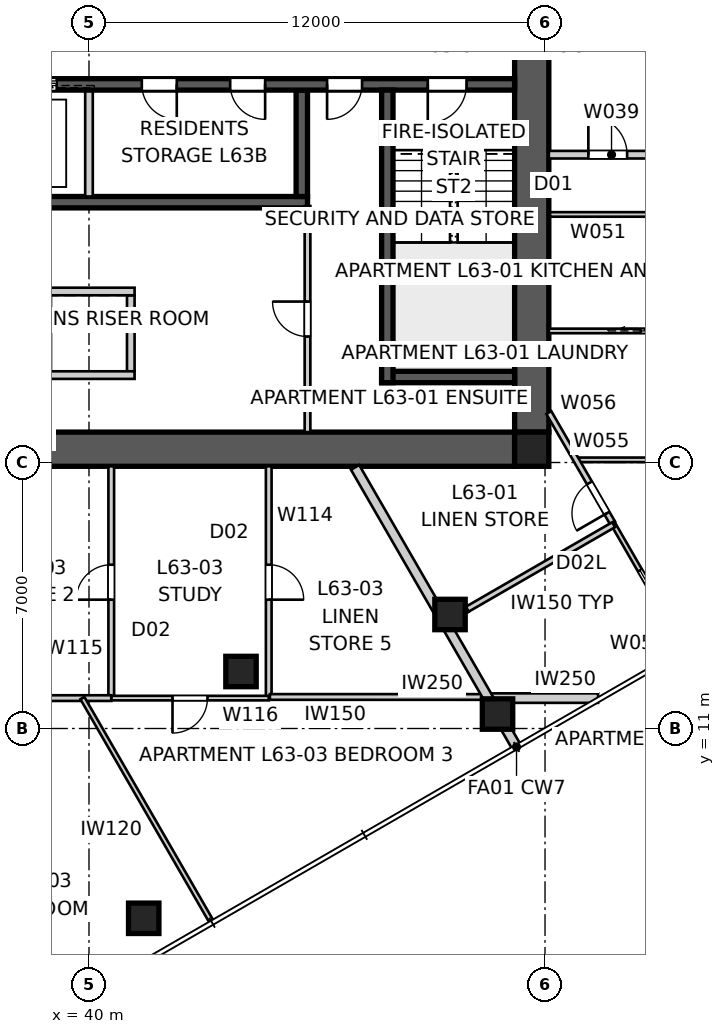
"""IFC4 building model, lengths in metres.
Left out: names, types, materials, properties, quantities, classifications, styles, units other than length and angle.
Written with IfcOpenShell. Run it as: python <this file> out.ifc"""

import sys

from ifc_helpers import new_model, si_unit, direction, frame, frame_2d, origin, origin_2d, place, context, subcontext, project, spatial, polyline, rectangle, outline, extrude, element, fill, save


model = new_model("IFC4")
c1 = context("Model", 3, precision=1e-05, world=origin(), true_north=direction((0.0, 1.0)))
c2 = subcontext(c1, "Body", "Model", "MODEL_VIEW")
j1 = project(units=[si_unit("LENGTHUNIT", "METRE"), si_unit("PLANEANGLEUNIT", "RADIAN")], contexts=[c1])
p1 = place(None, origin())
s1 = spatial("IfcSite", under=j1, at=p1, CompositionType="ELEMENT")
p2 = place(p1, origin())
s2 = spatial("IfcBuilding", under=s1, at=p2, CompositionType="ELEMENT")
p3 = place(p2, frame((0.0, 0.0, 228.6)))
s3 = spatial("IfcBuildingStorey", under=s2, at=p3, CompositionType="ELEMENT", Elevation=228.6)
p4 = place(p3, frame((51.2, 18.35, 0.0), z_axis=(0.0, 0.0, 1.0), x_axis=(-1.0, 0.0, 0.0)))
e1 = element("IfcWall", 1, at=p4, inside=s3, PredefinedType="SHEAR", context=c2, shape_type="SweptSolid", body=[
    extrude(outline(polyline([(0.0, -0.45), (22.4, -0.45), (22.4, -0.025), (22.85, -0.025), (22.85, 0.025), (22.4, 0.025), (22.4, 0.45), (0.0, 0.45), (0.0, 0.025), (-0.45, 0.025), (-0.45, -0.025), (0.0, -0.025), (0.0, -0.45)])), origin(), (0.0, 0.0, 1.0), 3.4),
])
p5 = place(p3, frame((51.65, 18.8, 0.0), z_axis=(0.0, 0.0, 1.0), x_axis=(0.0, 1.0, 0.0)))
e2 = element("IfcWall", 2, at=p5, inside=s3, PredefinedType="SHEAR", context=c2, shape_type="SweptSolid", body=[
    extrude(outline(polyline([(0.0, -0.45), (22.4, -0.45), (22.4, -0.025), (22.85, -0.025), (22.85, 0.025), (22.4, 0.025), (22.4, 0.45), (0.0, 0.45), (0.0, 0.025), (-0.45, 0.025), (-0.45, -0.025), (0.0, -0.025), (0.0, -0.45)])), origin(), (0.0, 0.0, 1.0), 3.4),
])
p6 = place(p5, frame((11.14, 0.0, 0.0)))
e3 = element("IfcOpeningElement", 3, at=p6, cuts=e2, PredefinedType="OPENING", context=c2, shape_type="SweptSolid", body=[
    extrude(rectangle(XDim=1.02, YDim=2.4, at=frame_2d((0.51, 1.2))), frame((0.0, 0.46, 0.0), z_axis=(0.0, -1.0, 0.0), x_axis=(1.0, 0.0, 0.0)), (0.0, 0.0, 1.0), 0.92),
])
p7 = place(p3, frame((51.2, 27.95, 0.0), z_axis=(0.0, 0.0, 1.0), x_axis=(-1.0, 0.0, 0.0)))
e4 = element("IfcWall", 4, at=p7, inside=s3, PredefinedType="SHEAR", context=c2, shape_type="SweptSolid", body=[
    extrude(rectangle(XDim=22.4, YDim=0.3, at=frame_2d((11.2, 0.0))), origin(), (0.0, 0.0, 1.0), 3.4),
])
p8 = place(p7, frame((19.04, 0.0, 0.0)))
e5 = element("IfcOpeningElement", 5, at=p8, cuts=e4, PredefinedType="OPENING", context=c2, shape_type="SweptSolid", body=[
    extrude(rectangle(XDim=0.92, YDim=2.1, at=frame_2d((0.46, 1.05))), frame((0.0, 0.16, 0.0), z_axis=(0.0, -1.0, 0.0), x_axis=(1.0, 0.0, 0.0)), (0.0, 0.0, 1.0), 0.32),
])
p9 = place(p7, frame((1.265, 0.0, 0.0)))
e6 = element("IfcOpeningElement", 6, at=p9, cuts=e4, PredefinedType="OPENING", context=c2, shape_type="SweptSolid", body=[
    extrude(rectangle(XDim=1.02, YDim=2.1, at=frame_2d((0.51, 1.05))), frame((0.0, 0.16, 0.0), z_axis=(0.0, -1.0, 0.0), x_axis=(1.0, 0.0, 0.0)), (0.0, 0.0, 1.0), 0.32),
])
p10 = place(p7, frame((4.015, 0.0, 0.0)))
e7 = element("IfcOpeningElement", 7, at=p10, cuts=e4, PredefinedType="OPENING", context=c2, shape_type="SweptSolid", body=[
    extrude(rectangle(XDim=0.92, YDim=2.1, at=frame_2d((0.46, 1.05))), frame((0.0, 0.16, 0.0), z_axis=(0.0, -1.0, 0.0), x_axis=(1.0, 0.0, 0.0)), (0.0, 0.0, 1.0), 0.32),
])
p11 = place(p7, frame((8.89, 0.0, 0.0)))
e8 = element("IfcOpeningElement", 8, at=p11, cuts=e4, PredefinedType="OPENING", context=c2, shape_type="SweptSolid", body=[
    extrude(rectangle(XDim=0.92, YDim=2.1, at=frame_2d((0.46, 1.05))), frame((0.0, 0.16, 0.0), z_axis=(0.0, -1.0, 0.0), x_axis=(1.0, 0.0, 0.0)), (0.0, 0.0, 1.0), 0.32),
])
p12 = place(p7, frame((6.565, 0.0, 0.0)))
e9 = element("IfcOpeningElement", 9, at=p12, cuts=e4, PredefinedType="OPENING", context=c2, shape_type="SweptSolid", body=[
    extrude(rectangle(XDim=0.92, YDim=2.1, at=frame_2d((0.46, 1.05))), frame((0.0, 0.16, 0.0), z_axis=(0.0, -1.0, 0.0), x_axis=(1.0, 0.0, 0.0)), (0.0, 0.0, 1.0), 0.32),
])
p13 = place(p7, frame((12.05, 0.0, 0.0)))
e10 = element("IfcOpeningElement", 10, at=p13, cuts=e4, PredefinedType="OPENING", context=c2, shape_type="SweptSolid", body=[
    extrude(rectangle(XDim=1.1, YDim=2.1, at=frame_2d((0.55, 1.05))), frame((0.0, 0.16, 0.0), z_axis=(0.0, -1.0, 0.0), x_axis=(1.0, 0.0, 0.0)), (0.0, 0.0, 1.0), 0.32),
])
p14 = place(p7, frame((14.85, 0.0, 0.0)))
e11 = element("IfcOpeningElement", 11, at=p14, cuts=e4, PredefinedType="OPENING", context=c2, shape_type="SweptSolid", body=[
    extrude(rectangle(XDim=1.1, YDim=2.1, at=frame_2d((0.55, 1.05))), frame((0.0, 0.16, 0.0), z_axis=(0.0, -1.0, 0.0), x_axis=(1.0, 0.0, 0.0)), (0.0, 0.0, 1.0), 0.32),
])
p15 = place(p3, frame((45.75, 24.85, 0.0), z_axis=(0.0, 0.0, 1.0), x_axis=(-1.0, 0.0, 0.0)))
e12 = element("IfcWall", 12, at=p15, inside=s3, PredefinedType="SHEAR", context=c2, shape_type="SweptSolid", body=[
    extrude(rectangle(XDim=11.5, YDim=0.3, at=frame_2d((5.75, 0.0))), origin(), (0.0, 0.0, 1.0), 3.4),
])
p16 = place(p3, frame((45.6, 27.8, 0.0), z_axis=(0.0, 0.0, 1.0), x_axis=(0.0, -1.0, 0.0)))
e13 = element("IfcWall", 13, at=p16, inside=s3, PredefinedType="SHEAR", context=c2, shape_type="SweptSolid", body=[
    extrude(rectangle(XDim=2.8, YDim=0.3, at=frame_2d((1.4, 0.0))), origin(), (0.0, 0.0, 1.0), 3.4),
])
p17 = place(p3, frame((40.0, 27.8, 0.0), z_axis=(0.0, 0.0, 1.0), x_axis=(0.0, -1.0, 0.0)))
e14 = element("IfcWall", 14, at=p17, inside=s3, PredefinedType="SOLIDWALL", context=c2, shape_type="SweptSolid", body=[
    extrude(rectangle(XDim=2.8, YDim=0.2, at=frame_2d((1.4, 0.0))), origin(), (0.0, 0.0, 1.0), 3.4),
])
p18 = place(p3, frame((47.85, 27.8, 0.0), z_axis=(0.0, 0.0, 1.0), x_axis=(0.0, -1.0, 0.0)))
e15 = element("IfcWall", 15, at=p18, inside=s3, PredefinedType="SHEAR", context=c2, shape_type="SweptSolid", body=[
    extrude(rectangle(XDim=7.7, YDim=0.3, at=frame_2d((3.85, 0.0))), origin(), (0.0, 0.0, 1.0), 3.4),
])
p19 = place(p3, frame((51.2, 20.25, 0.0), z_axis=(0.0, 0.0, 1.0), x_axis=(-1.0, 0.0, 0.0)))
e16 = element("IfcWall", 16, at=p19, inside=s3, PredefinedType="SHEAR", context=c2, shape_type="SweptSolid", body=[
    extrude(rectangle(XDim=3.5, YDim=0.3, at=frame_2d((1.75, 0.0))), origin(), (0.0, 0.0, 1.0), 3.4),
])
p20 = place(p3, frame((41.1, 22.4, 0.0), z_axis=(0.0, 0.0, 1.0), x_axis=(0.0, -1.0, 0.0)))
e17 = element("IfcWall", 17, at=p20, inside=s3, PredefinedType="SOLIDWALL", context=c2, shape_type="SweptSolid", body=[
    extrude(rectangle(XDim=2.0, YDim=0.2, at=frame_2d((1.0, 0.0))), origin(), (0.0, 0.0, 1.0), 3.4),
])
for number, where, z_axis, x_axis in (
    (18, (38.8, 22.5, 0.0), (0.0, 0.0, 1.0), (1.0, 0.0, 0.0)),
    (19, (38.8, 20.3, 0.0), (0.0, 0.0, 1.0), (1.0, 0.0, 0.0)),
):
    element("IfcWall", number, at=place(p3, frame(where, z_axis=z_axis, x_axis=x_axis)), inside=s3, PredefinedType="SOLIDWALL", context=c2, shape_type="SweptSolid", body=[
        extrude(rectangle(XDim=2.4, YDim=0.2, at=frame_2d((1.2, 0.0))), origin(), (0.0, 0.0, 1.0), 3.4),
    ])
p21 = place(p3, frame((51.65, 18.35, 0.0), z_axis=(0.0, 0.0, 1.0), x_axis=(1.0, 0.0, 0.0)))
e20 = element("IfcColumn", 20, at=p21, inside=s3, PredefinedType="COLUMN", context=c2, shape_type="SweptSolid", body=[
    extrude(rectangle(XDim=0.9, YDim=0.9, at=origin_2d()), origin(), (0.0, 0.0, 1.0), 3.4),
])
for number, where, z_axis, x_axis in (
    (21, (41.44, 6.005, 0.0), (0.0, 0.0, 1.0), (1.0, 0.0, 0.0)),
    (22, (50.75, 11.38, 0.0), (0.0, 0.0, 1.0), (1.0, 0.0, 0.0)),
    (23, (44.0, 12.5, 0.0), (0.0, 0.0, 1.0), (1.0, 0.0, 0.0)),
    (24, (49.5, 14.0, 0.0), (0.0, 0.0, 1.0), (1.0, 0.0, 0.0)),
):
    element("IfcColumn", number, at=place(p3, frame(where, z_axis=z_axis, x_axis=x_axis)), inside=s3, PredefinedType="COLUMN", context=c2, shape_type="SweptSolid", body=[
        extrude(rectangle(XDim=0.8, YDim=0.8, at=origin_2d()), origin(), (0.0, 0.0, 1.0), 3.4),
    ])
p22 = place(p3, frame((52.1, 26.1, 0.0), z_axis=(0.0, 0.0, 1.0), x_axis=(1.0, 0.0, 0.0)))
e25 = element("IfcWall", 25, at=p22, inside=s3, PredefinedType="PARTITIONING", context=c2, shape_type="SweptSolid", body=[
    extrude(rectangle(XDim=3.3, YDim=0.2, at=frame_2d((1.65, 0.0))), origin(), (0.0, 0.0, 1.0), 3.25),
])
p23 = place(p22, frame((1.04, 0.0, 0.0)))
e26 = element("IfcOpeningElement", 26, at=p23, cuts=e25, PredefinedType="OPENING", context=c2, shape_type="SweptSolid", body=[
    extrude(rectangle(XDim=1.02, YDim=2.34, at=frame_2d((0.51, 1.17))), frame((0.0, 0.11, 0.0), z_axis=(0.0, -1.0, 0.0), x_axis=(1.0, 0.0, 0.0)), (0.0, 0.0, 1.0), 0.22),
])
p24 = place(p3, frame((51.25, 10.514, 0.0), z_axis=(0.0, 0.0, 1.0), x_axis=(-0.500008511703, 0.866020489494, 0.0)))
e27 = element("IfcWall", 27, at=p24, inside=s3, PredefinedType="PARTITIONING", context=c2, shape_type="SweptSolid", body=[
    extrude(rectangle(XDim=8.496, YDim=0.25, at=frame_2d((4.248, 0.0))), origin(), (0.0, 0.0, 1.0), 3.25),
])
p25 = place(p3, frame((45.75, 18.8, 0.0), z_axis=(0.0, 0.0, 1.0), x_axis=(0.0, 1.0, 0.0)))
e28 = element("IfcWall", 28, at=p25, inside=s3, PredefinedType="SOLIDWALL", context=c2, shape_type="SweptSolid", body=[
    extrude(rectangle(XDim=5.95, YDim=0.15, at=frame_2d((2.975, 0.0))), origin(), (0.0, 0.0, 1.0), 3.25),
])
p26 = place(p25, frame((2.515, 0.0, 0.0)))
e29 = element("IfcOpeningElement", 29, at=p26, cuts=e28, PredefinedType="OPENING", context=c2, shape_type="SweptSolid", body=[
    extrude(rectangle(XDim=0.92, YDim=2.1, at=frame_2d((0.46, 1.05))), frame((0.0, 0.085, 0.0), z_axis=(0.0, -1.0, 0.0), x_axis=(1.0, 0.0, 0.0)), (0.0, 0.0, 1.0), 0.17),
])
p27 = place(p3, frame((58.17, 24.528, 0.0), z_axis=(0.0, 0.0, 1.0), x_axis=(-1.0, 0.0, 0.0)))
e30 = element("IfcWall", 30, at=p27, inside=s3, PredefinedType="PARTITIONING", context=c2, shape_type="SweptSolid", body=[
    extrude(rectangle(XDim=6.04, YDim=0.12, at=frame_2d((3.02, 0.0))), origin(), (0.0, 0.0, 1.0), 2.35),
])
p28 = place(p27, frame((2.54, 0.0, 0.0)))
e31 = element("IfcOpeningElement", 31, at=p28, cuts=e30, PredefinedType="OPENING", context=c2, shape_type="SweptSolid", body=[
    extrude(rectangle(XDim=0.96, YDim=2.1, at=frame_2d((0.48, 1.05))), frame((0.0, 0.07, 0.0), z_axis=(0.0, -1.0, 0.0), x_axis=(1.0, 0.0, 0.0)), (0.0, 0.0, 1.0), 0.14),
])
p29 = place(p3, frame((58.2, 18.07, 0.0), z_axis=(0.0, 0.0, 1.0), x_axis=(-1.0, 0.0, 0.0)))
e32 = element("IfcWall", 32, at=p29, inside=s3, PredefinedType="PARTITIONING", context=c2, shape_type="SweptSolid", body=[
    extrude(rectangle(XDim=5.381, YDim=0.12, at=frame_2d((2.691, 0.0))), origin(), (0.0, 0.0, 1.0), 3.25),
])
p30 = place(p29, frame((2.211, 0.0, 0.0)))
e33 = element("IfcOpeningElement", 33, at=p30, cuts=e32, PredefinedType="OPENING", context=c2, shape_type="SweptSolid", body=[
    extrude(rectangle(XDim=0.96, YDim=2.1, at=frame_2d((0.48, 1.05))), frame((0.0, 0.07, 0.0), z_axis=(0.0, -1.0, 0.0), x_axis=(1.0, 0.0, 0.0)), (0.0, 0.0, 1.0), 0.14),
])
p31 = place(p3, frame((53.779, 16.406, 0.0), z_axis=(0.0, 0.0, 1.0), x_axis=(-0.499969954228, 0.866042750024, 0.0)))
e34 = element("IfcWall", 34, at=p31, inside=s3, PredefinedType="SOLIDWALL", context=c2, shape_type="SweptSolid", body=[
    extrude(rectangle(XDim=3.359, YDim=0.15, at=frame_2d((1.679, 0.0))), origin(), (0.0, 0.0, 1.0), 3.25),
])
p32 = place(p31, frame((0.301, 0.0, 0.0)))
e35 = element("IfcOpeningElement", 35, at=p32, cuts=e34, PredefinedType="OPENING", context=c2, shape_type="SweptSolid", body=[
    extrude(rectangle(XDim=0.92, YDim=2.1, at=frame_2d((0.46, 1.05))), frame((0.0, 0.085, 0.0), z_axis=(0.0, -1.0, 0.0), x_axis=(1.0, 0.0, 0.0)), (0.0, 0.0, 1.0), 0.17),
])
p33 = place(p3, frame((52.1, 21.462, 0.0), z_axis=(0.0, 0.0, 1.0), x_axis=(1.0, 0.0, 0.0)))
e36 = element("IfcWall", 36, at=p33, inside=s3, PredefinedType="PARTITIONING", context=c2, shape_type="SweptSolid", body=[
    extrude(rectangle(XDim=6.1, YDim=0.12, at=frame_2d((3.05, 0.0))), origin(), (0.0, 0.0, 1.0), 3.25),
])
p34 = place(p33, frame((2.42, 0.0, 0.0)))
e37 = element("IfcOpeningElement", 37, at=p34, cuts=e36, PredefinedType="OPENING", context=c2, shape_type="SweptSolid", body=[
    extrude(rectangle(XDim=0.96, YDim=2.1, at=frame_2d((0.48, 1.05))), frame((0.0, 0.07, 0.0), z_axis=(0.0, -1.0, 0.0), x_axis=(1.0, 0.0, 0.0)), (0.0, 0.0, 1.0), 0.14),
])
p35 = place(p3, frame((55.678, 13.117, 0.0), z_axis=(0.0, 0.0, 1.0), x_axis=(-0.500024807712, 0.866011080572, 0.0)))
e38 = element("IfcWall", 38, at=p35, inside=s3, PredefinedType="PARTITIONING", context=c2, shape_type="SweptSolid", body=[
    extrude(rectangle(XDim=3.798, YDim=0.12, at=frame_2d((1.899, 0.0))), origin(), (0.0, 0.0, 1.0), 3.25),
])
p36 = place(p35, frame((1.399, 0.0, 0.0)))
e39 = element("IfcOpeningElement", 39, at=p36, cuts=e38, PredefinedType="OPENING", context=c2, shape_type="SweptSolid", body=[
    extrude(rectangle(XDim=0.96, YDim=2.1, at=frame_2d((0.48, 1.05))), frame((0.0, 0.07, 0.0), z_axis=(0.0, -1.0, 0.0), x_axis=(1.0, 0.0, 0.0)), (0.0, 0.0, 1.0), 0.14),
])
p37 = place(p3, frame((49.356, 13.795, 0.0), z_axis=(0.0, 0.0, 1.0), x_axis=(0.866038486578, 0.499977339252, 0.0)))
e40 = element("IfcWall", 40, at=p37, inside=s3, PredefinedType="SOLIDWALL", context=c2, shape_type="SweptSolid", body=[
    extrude(rectangle(XDim=0.691, YDim=0.15, at=frame_2d((0.345, 0.0))), origin(), (0.0, 0.0, 1.0), 2.25),
])
p38 = place(p3, frame((49.955, 14.14, 0.0), z_axis=(0.0, 0.0, 1.0), x_axis=(0.866017295027, 0.500014044516, 0.0)))
e41 = element("IfcWall", 41, at=p38, inside=s3, PredefinedType="SOLIDWALL", context=c2, shape_type="SweptSolid", body=[
    extrude(rectangle(XDim=4.445, YDim=0.15, at=frame_2d((2.223, 0.0))), origin(), (0.0, 0.0, 1.0), 3.25),
])
p39 = place(p3, frame((53.397, 11.8, 0.0), z_axis=(0.0, 0.0, 1.0), x_axis=(-1.0, 0.0, 0.0)))
e42 = element("IfcWall", 42, at=p39, inside=s3, PredefinedType="PARTITIONING", context=c2, shape_type="SweptSolid", body=[
    extrude(rectangle(XDim=2.889, YDim=0.25, at=frame_2d((1.444, 0.0))), origin(), (0.0, 0.0, 1.0), 3.25),
])
p40 = place(p3, frame((44.729, 17.9, 0.0), z_axis=(0.0, 0.0, 1.0), x_axis=(0.0, -1.0, 0.0)))
e43 = element("IfcWall", 43, at=p40, inside=s3, PredefinedType="SOLIDWALL", context=c2, shape_type="SweptSolid", body=[
    extrude(rectangle(XDim=6.1, YDim=0.15, at=frame_2d((3.05, 0.0))), origin(), (0.0, 0.0, 1.0), 3.25),
])
p41 = place(p40, frame((2.59, 0.0, 0.0)))
e44 = element("IfcOpeningElement", 44, at=p41, cuts=e43, PredefinedType="OPENING", context=c2, shape_type="SweptSolid", body=[
    extrude(rectangle(XDim=0.92, YDim=2.34, at=frame_2d((0.46, 1.17))), frame((0.0, 0.085, 0.0), z_axis=(0.0, -1.0, 0.0), x_axis=(1.0, 0.0, 0.0)), (0.0, 0.0, 1.0), 0.17),
])
p42 = place(p3, frame((40.586, 11.8, 0.0), z_axis=(0.0, 0.0, 1.0), x_axis=(0.0, 1.0, 0.0)))
e45 = element("IfcWall", 45, at=p42, inside=s3, PredefinedType="SOLIDWALL", context=c2, shape_type="SweptSolid", body=[
    extrude(rectangle(XDim=6.1, YDim=0.15, at=frame_2d((3.05, 0.0))), origin(), (0.0, 0.0, 1.0), 3.25),
])
p43 = place(p42, frame((2.59, 0.0, 0.0)))
e46 = element("IfcOpeningElement", 46, at=p43, cuts=e45, PredefinedType="OPENING", context=c2, shape_type="SweptSolid", body=[
    extrude(rectangle(XDim=0.92, YDim=2.34, at=frame_2d((0.46, 1.17))), frame((0.0, 0.085, 0.0), z_axis=(0.0, -1.0, 0.0), x_axis=(1.0, 0.0, 0.0)), (0.0, 0.0, 1.0), 0.17),
])
p44 = place(p3, frame((44.729, 11.8, 0.0), z_axis=(0.0, 0.0, 1.0), x_axis=(-1.0, 0.0, 0.0)))
e47 = element("IfcWall", 47, at=p44, inside=s3, PredefinedType="PARTITIONING", context=c2, shape_type="SweptSolid", body=[
    extrude(rectangle(XDim=4.144, YDim=0.12, at=frame_2d((2.072, 0.0))), origin(), (0.0, 0.0, 1.0), 3.25),
])
p45 = place(p44, frame((1.612, 0.0, 0.0)))
e48 = element("IfcOpeningElement", 48, at=p45, cuts=e47, PredefinedType="OPENING", context=c2, shape_type="SweptSolid", body=[
    extrude(rectangle(XDim=0.92, YDim=2.34, at=frame_2d((0.46, 1.17))), frame((0.0, 0.07, 0.0), z_axis=(0.0, -1.0, 0.0), x_axis=(1.0, 0.0, 0.0)), (0.0, 0.0, 1.0), 0.14),
])
p46 = place(p3, frame((50.491, 11.829, 0.0), z_axis=(0.0, 0.0, 1.0), x_axis=(-0.999999991834, 0.000127795526, 0.0)))
e49 = element("IfcWall", 49, at=p46, inside=s3, PredefinedType="SOLIDWALL", context=c2, shape_type="SweptSolid", body=[
    extrude(rectangle(XDim=5.731, YDim=0.15, at=frame_2d((2.866, 0.0))), origin(), (0.0, 0.0, 1.0), 3.25),
])
p47 = place(p3, frame((40.586, 11.8, 0.0), z_axis=(0.0, 0.0, 1.0), x_axis=(-1.0, 0.0, 0.0)))
e50 = element("IfcWall", 50, at=p47, inside=s3, PredefinedType="SOLIDWALL", context=c2, shape_type="SweptSolid", body=[
    extrude(rectangle(XDim=4.112, YDim=0.15, at=frame_2d((2.056, 0.0))), origin(), (0.0, 0.0, 1.0), 3.25),
])
p48 = place(p3, frame((43.219, 5.924, 0.0), z_axis=(0.0, 0.0, 1.0), x_axis=(-0.500009005995, 0.866020204108, 0.0)))
e51 = element("IfcWall", 51, at=p48, inside=s3, PredefinedType="PARTITIONING", context=c2, shape_type="SweptSolid", body=[
    extrude(rectangle(XDim=6.785, YDim=0.12, at=frame_2d((3.393, 0.0))), origin(), (0.0, 0.0, 1.0), 3.25),
])
p49 = place(p9, origin())
e52 = element("IfcDoor", 52, at=p49, inside=s3, OperationType="SINGLE_SWING_RIGHT", PredefinedType="DOOR", context=c2, shape_type="SweptSolid", body=[
    extrude(rectangle(XDim=1.02, YDim=2.1, at=frame_2d((0.51, 1.05))), frame((0.0, 0.025, 0.0), z_axis=(0.0, -1.0, 0.0), x_axis=(1.0, 0.0, 0.0)), (0.0, 0.0, 1.0), 0.05),
])
fill(e6, e52)
p50 = place(p10, origin())
e53 = element("IfcDoor", 53, at=p50, inside=s3, OperationType="SINGLE_SWING_RIGHT", PredefinedType="DOOR", context=c2, shape_type="SweptSolid", body=[
    extrude(rectangle(XDim=0.92, YDim=2.1, at=frame_2d((0.46, 1.05))), frame((0.0, 0.025, 0.0), z_axis=(0.0, -1.0, 0.0), x_axis=(1.0, 0.0, 0.0)), (0.0, 0.0, 1.0), 0.05),
])
fill(e7, e53)
p51 = place(p23, origin())
e54 = element("IfcDoor", 54, at=p51, inside=s3, OperationType="SINGLE_SWING_LEFT", PredefinedType="DOOR", context=c2, shape_type="SweptSolid", body=[
    extrude(rectangle(XDim=1.02, YDim=2.34, at=frame_2d((0.51, 1.17))), frame((0.0, 0.025, 0.0), z_axis=(0.0, -1.0, 0.0), x_axis=(1.0, 0.0, 0.0)), (0.0, 0.0, 1.0), 0.05),
])
fill(e26, e54)
p52 = place(p26, origin())
e55 = element("IfcDoor", 55, at=p52, inside=s3, OperationType="SINGLE_SWING_RIGHT", PredefinedType="DOOR", context=c2, shape_type="SweptSolid", body=[
    extrude(rectangle(XDim=0.92, YDim=2.1, at=frame_2d((0.46, 1.05))), frame((0.0, 0.025, 0.0), z_axis=(0.0, -1.0, 0.0), x_axis=(1.0, 0.0, 0.0)), (0.0, 0.0, 1.0), 0.05),
])
fill(e29, e55)
p53 = place(p34, origin())
e56 = element("IfcDoor", 56, at=p53, inside=s3, OperationType="SLIDING_TO_LEFT", PredefinedType="DOOR", context=c2, shape_type="SweptSolid", body=[
    extrude(rectangle(XDim=0.96, YDim=2.1, at=frame_2d((0.48, 1.05))), frame((0.0, 0.025, 0.0), z_axis=(0.0, -1.0, 0.0), x_axis=(1.0, 0.0, 0.0)), (0.0, 0.0, 1.0), 0.05),
])
fill(e37, e56)
p54 = place(p36, origin())
e57 = element("IfcDoor", 57, at=p54, inside=s3, OperationType="SLIDING_TO_LEFT", PredefinedType="DOOR", context=c2, shape_type="SweptSolid", body=[
    extrude(rectangle(XDim=0.96, YDim=2.1, at=frame_2d((0.48, 1.05))), frame((0.0, 0.025, 0.0), z_axis=(0.0, -1.0, 0.0), x_axis=(1.0, 0.0, 0.0)), (0.0, 0.0, 1.0), 0.05),
])
fill(e39, e57)
p55 = place(p32, origin())
e58 = element("IfcDoor", 58, at=p55, inside=s3, OperationType="SINGLE_SWING_LEFT", PredefinedType="DOOR", context=c2, shape_type="SweptSolid", body=[
    extrude(rectangle(XDim=0.92, YDim=2.1, at=frame_2d((0.46, 1.05))), frame((0.0, 0.025, 0.0), z_axis=(0.0, -1.0, 0.0), x_axis=(1.0, 0.0, 0.0)), (0.0, 0.0, 1.0), 0.05),
])
fill(e35, e58)
p56 = place(p43, origin())
e59 = element("IfcDoor", 59, at=p56, inside=s3, OperationType="SINGLE_SWING_LEFT", PredefinedType="DOOR", context=c2, shape_type="SweptSolid", body=[
    extrude(rectangle(XDim=0.92, YDim=2.34, at=frame_2d((0.46, 1.17))), frame((0.0, 0.025, 0.0), z_axis=(0.0, -1.0, 0.0), x_axis=(1.0, 0.0, 0.0)), (0.0, 0.0, 1.0), 0.05),
])
fill(e46, e59)
p57 = place(p41, origin())
e60 = element("IfcDoor", 60, at=p57, inside=s3, OperationType="SINGLE_SWING_RIGHT", PredefinedType="DOOR", context=c2, shape_type="SweptSolid", body=[
    extrude(rectangle(XDim=0.92, YDim=2.34, at=frame_2d((0.46, 1.17))), frame((0.0, 0.025, 0.0), z_axis=(0.0, -1.0, 0.0), x_axis=(1.0, 0.0, 0.0)), (0.0, 0.0, 1.0), 0.05),
])
fill(e44, e60)
p58 = place(p45, origin())
e61 = element("IfcDoor", 61, at=p58, inside=s3, OperationType="SINGLE_SWING_RIGHT", PredefinedType="DOOR", context=c2, shape_type="SweptSolid", body=[
    extrude(rectangle(XDim=0.92, YDim=2.34, at=frame_2d((0.46, 1.17))), frame((0.0, 0.025, 0.0), z_axis=(0.0, -1.0, 0.0), x_axis=(1.0, 0.0, 0.0)), (0.0, 0.0, 1.0), 0.05),
])
fill(e48, e61)
p59 = place(p11, origin())
e62 = element("IfcDoor", 62, at=p59, inside=s3, OperationType="SINGLE_SWING_LEFT", PredefinedType="DOOR", context=c2, shape_type="SweptSolid", body=[
    extrude(rectangle(XDim=0.92, YDim=2.1, at=frame_2d((0.46, 1.05))), frame((0.0, 0.025, 0.0), z_axis=(0.0, -1.0, 0.0), x_axis=(1.0, 0.0, 0.0)), (0.0, 0.0, 1.0), 0.05),
])
fill(e8, e62)
p60 = place(p12, origin())
e63 = element("IfcDoor", 63, at=p60, inside=s3, OperationType="SINGLE_SWING_LEFT", PredefinedType="DOOR", context=c2, shape_type="SweptSolid", body=[
    extrude(rectangle(XDim=0.92, YDim=2.1, at=frame_2d((0.46, 1.05))), frame((0.0, 0.025, 0.0), z_axis=(0.0, -1.0, 0.0), x_axis=(1.0, 0.0, 0.0)), (0.0, 0.0, 1.0), 0.05),
])
fill(e9, e63)
p61 = place(p13, origin())
e64 = element("IfcDoor", 64, at=p61, inside=s3, OperationType="SLIDING_TO_LEFT", PredefinedType="DOOR", context=c2, shape_type="SweptSolid", body=[
    extrude(rectangle(XDim=1.1, YDim=2.1, at=frame_2d((0.55, 1.05))), frame((0.0, 0.025, 0.0), z_axis=(0.0, -1.0, 0.0), x_axis=(1.0, 0.0, 0.0)), (0.0, 0.0, 1.0), 0.05),
])
fill(e10, e64)
save(model, sys.argv[1])
